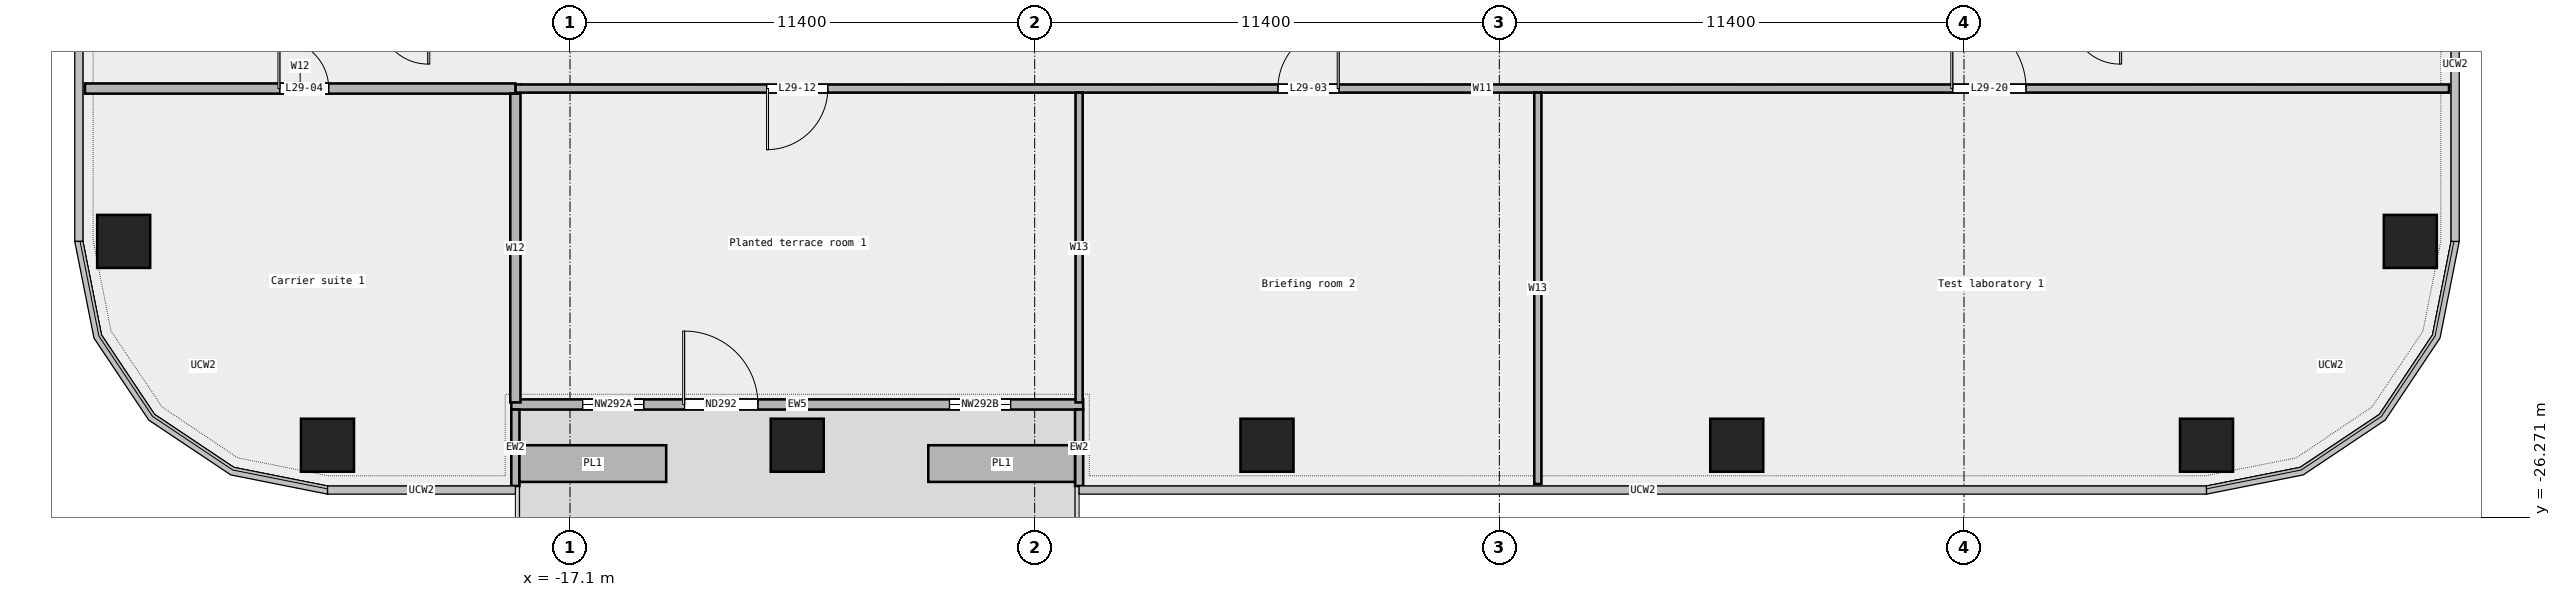
"""IFC4 building model, lengths in metres.
Left out: names, types, materials, properties, quantities, classifications, styles, units other than length and angle.
Written with IfcOpenShell. Run it as: python <this file> out.ifc"""

import sys

from ifc_helpers import new_model, si_unit, direction, frame, frame_2d, origin, origin_2d, place, context, subcontext, project, spatial, rectangle, extrude, element, fill, save


model = new_model("IFC4")
c1 = context("Model", 3, precision=1e-05, world=origin(), true_north=direction((0.0, 1.0)))
c2 = subcontext(c1, "Body", "Model", "MODEL_VIEW")
j1 = project(units=[si_unit("LENGTHUNIT", "METRE"), si_unit("PLANEANGLEUNIT", "RADIAN")], contexts=[c1])
p1 = place(None, origin())
s1 = spatial("IfcSite", under=j1, at=p1, CompositionType="ELEMENT")
p2 = place(p1, origin())
s2 = spatial("IfcBuilding", under=s1, at=p2, CompositionType="ELEMENT")
p3 = place(p2, frame((0.0, 0.0, 144.1)))
s3 = spatial("IfcBuildingStorey", under=s2, at=p3, CompositionType="ELEMENT", Elevation=144.1)
for number, where, z_axis, x_axis in (
    (1, (-23.05, -24.5, 0.0), (0.0, 0.0, 1.0), (1.0, 0.0, 0.0)),
    (2, (-11.525, -24.5, 0.0), (0.0, 0.0, 1.0), (1.0, 0.0, 0.0)),
    (3, (0.0, -24.5, 0.0), (0.0, 0.0, 1.0), (1.0, 0.0, 0.0)),
    (4, (11.525, -24.5, 0.0), (0.0, 0.0, 1.0), (1.0, 0.0, 0.0)),
    (5, (23.05, -24.5, 0.0), (0.0, 0.0, 1.0), (1.0, 0.0, 0.0)),
    (6, (28.05, -19.5, 0.0), (0.0, 0.0, 1.0), (1.0, 0.0, 0.0)),
    (7, (-28.05, -19.5, 0.0), (0.0, 0.0, 1.0), (1.0, 0.0, 0.0)),
):
    element("IfcColumn", number, at=place(p3, frame(where, z_axis=z_axis, x_axis=x_axis)), inside=s3, PredefinedType="COLUMN", context=c2, shape_type="SweptSolid", body=[
        extrude(rectangle(XDim=1.3, YDim=1.3, at=origin_2d()), origin(), (0.0, 0.0, 1.0), 3.9),
    ])
p4 = place(p3, frame((-18.54, -23.5, 0.0), z_axis=(0.0, 0.0, 1.0), x_axis=(1.0, 0.0, 0.0)))
e8 = element("IfcWall", 8, at=p4, inside=s3, PredefinedType="STANDARD", context=c2, shape_type="SweptSolid", body=[
    extrude(rectangle(XDim=14.03, YDim=0.25, at=frame_2d((7.015, 0.0))), origin(), (0.0, 0.0, 1.0), 3.9),
])
p5 = place(p4, frame((1.75, 0.0, 0.45)))
e9 = element("IfcOpeningElement", 9, at=p5, cuts=e8, PredefinedType="OPENING", context=c2, shape_type="SweptSolid", body=[
    extrude(rectangle(XDim=1.5, YDim=2.4, at=frame_2d((0.75, 1.2))), frame((0.0, 0.137, 0.0), z_axis=(0.0, -1.0, 0.0), x_axis=(1.0, 0.0, 0.0)), (0.0, 0.0, 1.0), 0.274),
])
p6 = place(p4, frame((4.25, 0.0, 0.0)))
e10 = element("IfcOpeningElement", 10, at=p6, cuts=e8, PredefinedType="OPENING", context=c2, shape_type="SweptSolid", body=[
    extrude(rectangle(XDim=1.8, YDim=2.4, at=frame_2d((0.9, 1.2))), frame((0.0, 0.137, 0.0), z_axis=(0.0, -1.0, 0.0), x_axis=(1.0, 0.0, 0.0)), (0.0, 0.0, 1.0), 0.274),
])
p7 = place(p4, frame((10.75, 0.0, 0.45)))
e11 = element("IfcOpeningElement", 11, at=p7, cuts=e8, PredefinedType="OPENING", context=c2, shape_type="SweptSolid", body=[
    extrude(rectangle(XDim=1.5, YDim=2.4, at=frame_2d((0.75, 1.2))), frame((0.0, 0.137, 0.0), z_axis=(0.0, -1.0, 0.0), x_axis=(1.0, 0.0, 0.0)), (0.0, 0.0, 1.0), 0.274),
])
for number, where, z_axis, x_axis in (
    (12, (-18.44, -25.5, 0.0), (0.0, 0.0, 1.0), (0.0, 1.0, 0.0)),
    (13, (-4.61, -25.5, 0.0), (0.0, 0.0, 1.0), (0.0, 1.0, 0.0)),
):
    element("IfcWall", number, at=place(p3, frame(where, z_axis=z_axis, x_axis=x_axis)), inside=s3, PredefinedType="STANDARD", context=c2, shape_type="SweptSolid", body=[
        extrude(rectangle(XDim=1.875, YDim=0.2, at=frame_2d((0.938, 0.0))), origin(), (0.0, 0.0, 1.0), 3.9),
    ])
for number, where, z_axis, x_axis in (
    (14, (-18.34, -24.95, 0.0), (0.0, 0.0, 1.0), (1.0, 0.0, 0.0)),
    (15, (-8.31, -24.95, 0.0), (0.0, 0.0, 1.0), (1.0, 0.0, 0.0)),
):
    element("IfcWall", number, at=place(p3, frame(where, z_axis=z_axis, x_axis=x_axis)), inside=s3, PredefinedType="STANDARD", context=c2, shape_type="SweptSolid", body=[
        extrude(rectangle(XDim=3.6, YDim=0.9, at=frame_2d((1.8, 0.0))), origin(), (0.0, 0.0, 1.0), 0.7),
    ])
p8 = place(p3, frame((-18.44, -15.75, 0.0), z_axis=(0.0, 0.0, 1.0), x_axis=(1.0, 0.0, 0.0)))
e16 = element("IfcWall", 16, at=p8, inside=s3, PredefinedType="PARTITIONING", context=c2, shape_type="SweptSolid", body=[
    extrude(rectangle(XDim=47.44, YDim=0.2, at=frame_2d((23.72, 0.0))), origin(), (0.0, 0.0, 1.0), 3.9),
])
p9 = place(p8, frame((18.708, 0.0, 0.0)))
e17 = element("IfcOpeningElement", 17, at=p9, cuts=e16, PredefinedType="OPENING", context=c2, shape_type="SweptSolid", body=[
    extrude(rectangle(XDim=1.5, YDim=2.1, at=frame_2d((0.75, 1.05))), frame((0.0, 0.112, 0.0), z_axis=(0.0, -1.0, 0.0), x_axis=(1.0, 0.0, 0.0)), (0.0, 0.0, 1.0), 0.224),
])
p10 = place(p8, frame((6.165, 0.0, 0.0)))
e18 = element("IfcOpeningElement", 18, at=p10, cuts=e16, PredefinedType="OPENING", context=c2, shape_type="SweptSolid", body=[
    extrude(rectangle(XDim=1.5, YDim=2.1, at=frame_2d((0.75, 1.05))), frame((0.0, 0.112, 0.0), z_axis=(0.0, -1.0, 0.0), x_axis=(1.0, 0.0, 0.0)), (0.0, 0.0, 1.0), 0.224),
])
p11 = place(p8, frame((35.262, 0.0, 0.0)))
e19 = element("IfcOpeningElement", 19, at=p11, cuts=e16, PredefinedType="OPENING", context=c2, shape_type="SweptSolid", body=[
    extrude(rectangle(XDim=1.8, YDim=2.1, at=frame_2d((0.9, 1.05))), frame((0.0, 0.112, 0.0), z_axis=(0.0, -1.0, 0.0), x_axis=(1.0, 0.0, 0.0)), (0.0, 0.0, 1.0), 0.224),
])
p12 = place(p3, frame((-29.0, -15.75, 0.0), z_axis=(0.0, 0.0, 1.0), x_axis=(1.0, 0.0, 0.0)))
e20 = element("IfcWall", 20, at=p12, inside=s3, PredefinedType="PARTITIONING", context=c2, shape_type="SweptSolid", body=[
    extrude(rectangle(XDim=10.56, YDim=0.25, at=frame_2d((5.28, 0.0))), origin(), (0.0, 0.0, 1.0), 3.9),
])
p13 = place(p12, frame((4.78, 0.0, 0.0)))
e21 = element("IfcOpeningElement", 21, at=p13, cuts=e20, PredefinedType="OPENING", context=c2, shape_type="SweptSolid", body=[
    extrude(rectangle(XDim=1.2, YDim=2.1, at=frame_2d((0.6, 1.05))), frame((0.0, 0.137, 0.0), z_axis=(0.0, -1.0, 0.0), x_axis=(1.0, 0.0, 0.0)), (0.0, 0.0, 1.0), 0.274),
])
p14 = place(p3, frame((-18.44, -23.45, 0.0), z_axis=(0.0, 0.0, 1.0), x_axis=(0.0, 1.0, 0.0)))
e22 = element("IfcWall", 22, at=p14, inside=s3, PredefinedType="PARTITIONING", context=c2, shape_type="SweptSolid", body=[
    extrude(rectangle(XDim=7.575, YDim=0.25, at=frame_2d((3.788, 0.0))), origin(), (0.0, 0.0, 1.0), 3.9),
])
p15 = place(p3, frame((-4.61, -23.45, 0.0), z_axis=(0.0, 0.0, 1.0), x_axis=(0.0, 1.0, 0.0)))
e23 = element("IfcWall", 23, at=p15, inside=s3, PredefinedType="PARTITIONING", context=c2, shape_type="SweptSolid", body=[
    extrude(rectangle(XDim=7.6, YDim=0.175, at=frame_2d((3.8, 0.0))), origin(), (0.0, 0.0, 1.0), 3.9),
])
p16 = place(p3, frame((6.645, -25.45, 0.0), z_axis=(0.0, 0.0, 1.0), x_axis=(0.0, 1.0, 0.0)))
e24 = element("IfcWall", 24, at=p16, inside=s3, PredefinedType="PARTITIONING", context=c2, shape_type="SweptSolid", body=[
    extrude(rectangle(XDim=9.6, YDim=0.175, at=frame_2d((4.8, 0.0))), origin(), (0.0, 0.0, 1.0), 3.9),
])
p17 = place(p5, origin())
e25 = element("IfcWindow", 25, at=p17, inside=s3, PartitioningType="SINGLE_PANEL", PredefinedType="WINDOW", context=c2, shape_type="SweptSolid", body=[
    extrude(rectangle(XDim=1.5, YDim=2.4, at=frame_2d((0.75, 1.2))), frame((0.0, 0.03, 0.0), z_axis=(0.0, -1.0, 0.0), x_axis=(1.0, 0.0, 0.0)), (0.0, 0.0, 1.0), 0.06),
])
fill(e9, e25)
p18 = place(p6, origin())
e26 = element("IfcDoor", 26, at=p18, inside=s3, OperationType="DOUBLE_DOOR_SINGLE_SWING", PredefinedType="DOOR", context=c2, shape_type="SweptSolid", body=[
    extrude(rectangle(XDim=1.8, YDim=2.4, at=frame_2d((0.9, 1.2))), frame((0.0, 0.025, 0.0), z_axis=(0.0, -1.0, 0.0), x_axis=(1.0, 0.0, 0.0)), (0.0, 0.0, 1.0), 0.05),
])
fill(e10, e26)
p19 = place(p7, origin())
e27 = element("IfcWindow", 27, at=p19, inside=s3, PartitioningType="SINGLE_PANEL", PredefinedType="WINDOW", context=c2, shape_type="SweptSolid", body=[
    extrude(rectangle(XDim=1.5, YDim=2.4, at=frame_2d((0.75, 1.2))), frame((0.0, 0.03, 0.0), z_axis=(0.0, -1.0, 0.0), x_axis=(1.0, 0.0, 0.0)), (0.0, 0.0, 1.0), 0.06),
])
fill(e11, e27)
p20 = place(p9, origin())
e28 = element("IfcDoor", 28, at=p20, inside=s3, OperationType="DOUBLE_DOOR_SINGLE_SWING", PredefinedType="DOOR", context=c2, shape_type="SweptSolid", body=[
    extrude(rectangle(XDim=1.5, YDim=2.1, at=frame_2d((0.75, 1.05))), frame((0.0, 0.025, 0.0), z_axis=(0.0, -1.0, 0.0), x_axis=(1.0, 0.0, 0.0)), (0.0, 0.0, 1.0), 0.05),
])
fill(e17, e28)
p21 = place(p13, origin())
e29 = element("IfcDoor", 29, at=p21, inside=s3, OperationType="SINGLE_SWING_LEFT", PredefinedType="DOOR", context=c2, shape_type="SweptSolid", body=[
    extrude(rectangle(XDim=1.2, YDim=2.1, at=frame_2d((0.6, 1.05))), frame((0.0, 0.025, 0.0), z_axis=(0.0, -1.0, 0.0), x_axis=(1.0, 0.0, 0.0)), (0.0, 0.0, 1.0), 0.05),
])
fill(e21, e29)
p22 = place(p10, origin())
e30 = element("IfcDoor", 30, at=p22, inside=s3, OperationType="DOUBLE_DOOR_SINGLE_SWING", PredefinedType="DOOR", context=c2, shape_type="SweptSolid", body=[
    extrude(rectangle(XDim=1.5, YDim=2.1, at=frame_2d((0.75, 1.05))), frame((0.0, 0.025, 0.0), z_axis=(0.0, -1.0, 0.0), x_axis=(1.0, 0.0, 0.0)), (0.0, 0.0, 1.0), 0.05),
])
fill(e18, e30)
p23 = place(p11, origin())
e31 = element("IfcDoor", 31, at=p23, inside=s3, OperationType="DOUBLE_DOOR_SINGLE_SWING", PredefinedType="DOOR", context=c2, shape_type="SweptSolid", body=[
    extrude(rectangle(XDim=1.8, YDim=2.1, at=frame_2d((0.9, 1.05))), frame((0.0, 0.025, 0.0), z_axis=(0.0, -1.0, 0.0), x_axis=(1.0, 0.0, 0.0)), (0.0, 0.0, 1.0), 0.05),
])
fill(e19, e31)
save(model, sys.argv[1])
